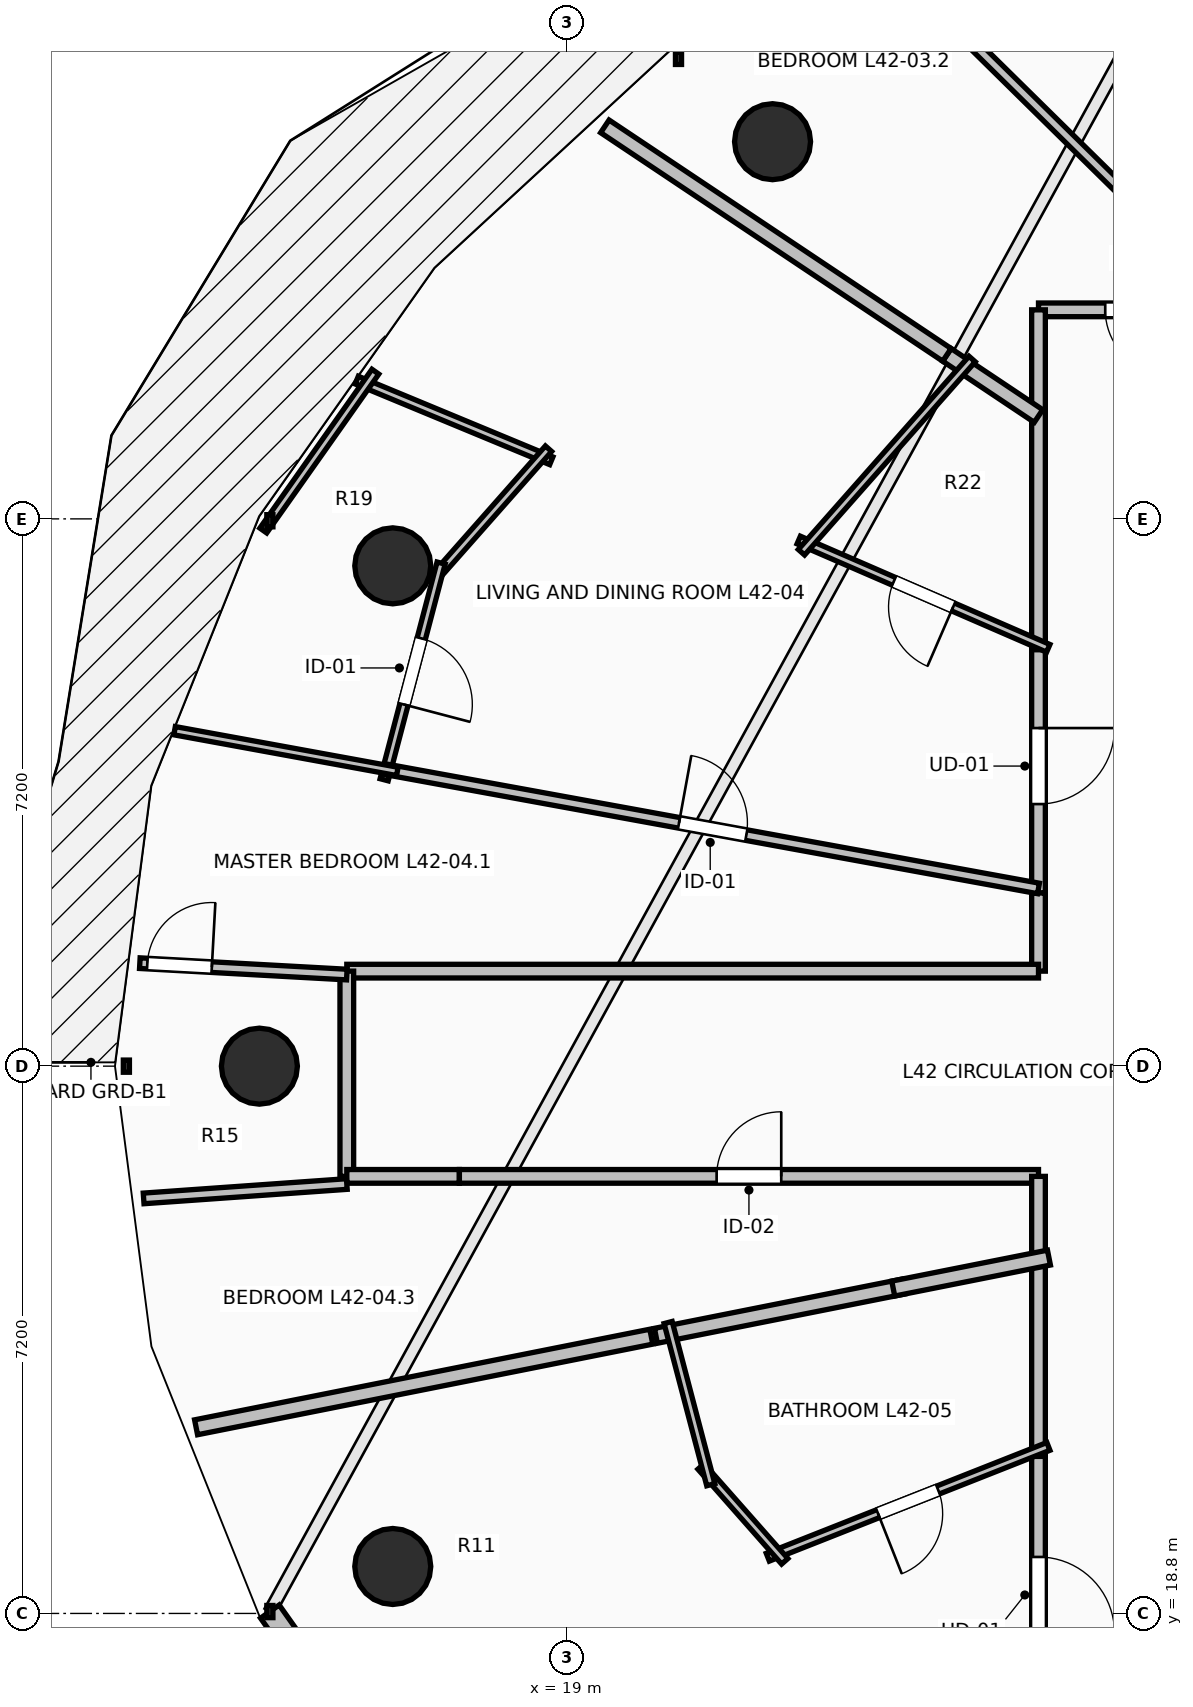
"""IFC4 building model, lengths in metres.
Left out: names, types, materials, properties, quantities, classifications, styles, units other than length and angle.
Written with IfcOpenShell. Run it as: python <this file> out.ifc"""

import sys

from ifc_helpers import new_model, si_unit, direction, frame, frame_2d, origin, origin_2d, place, context, subcontext, project, spatial, rectangle, circle, extrude, element, fill, save


model = new_model("IFC4")
c1 = context("Model", 3, precision=1e-05, world=origin(), true_north=direction((0.0, 1.0)))
c2 = subcontext(c1, "Body", "Model", "MODEL_VIEW")
j1 = project(units=[si_unit("LENGTHUNIT", "METRE"), si_unit("PLANEANGLEUNIT", "RADIAN")], contexts=[c1])
p1 = place(None, origin())
s1 = spatial("IfcSite", under=j1, at=p1, CompositionType="ELEMENT")
p2 = place(p1, origin())
s2 = spatial("IfcBuilding", under=s1, at=p2, CompositionType="ELEMENT")
p3 = place(p2, frame((0.0, 0.0, 157.1)))
s3 = spatial("IfcBuildingStorey", under=s2, at=p3, CompositionType="ELEMENT", Elevation=157.1)
for number, where, z_axis, x_axis in (
    (1, (21.701, 38.162, 0.0), (0.0, 0.0, 1.0), (-0.707, 0.707, 0.0)),
    (2, (16.705, 32.582, 0.0), (0.0, 0.0, 1.0), (-0.924, 0.383, 0.0)),
    (3, (14.95, 26.0, 0.0), (0.0, 0.0, 1.0), (-1.0, 0.0, 0.0)),
    (4, (16.705, 19.418, 0.0), (0.0, 0.0, 1.0), (-0.924, -0.383, 0.0)),
):
    element("IfcColumn", number, at=place(p3, frame(where, z_axis=z_axis, x_axis=x_axis)), inside=s3, PredefinedType="COLUMN", context=c2, shape_type="SweptSolid", body=[
        extrude(circle(Radius=0.5, at=origin_2d()), origin(), (0.0, 0.0, 1.0), 3.5),
    ])
p4 = place(p3, frame((15.088, 18.825, 0.0), z_axis=(0.0, 0.0, 1.0), x_axis=(0.577269753207, -0.816553508371, 0.0)))
e5 = element("IfcWall", 5, at=p4, inside=s3, PredefinedType="STANDARD", context=c2, shape_type="SweptSolid", body=[
    extrude(rectangle(XDim=3.97, YDim=0.3, at=frame_2d((1.985, 0.0))), origin(), (0.0, 0.0, 1.0), 3.24),
])
p5 = place(p3, frame((27.806, 35.95, 0.0), z_axis=(0.0, 0.0, 1.0), x_axis=(-1.0, 0.0, 0.0)))
e6 = element("IfcWall", 6, at=p5, inside=s3, PredefinedType="PARTITIONING", context=c2, shape_type="SweptSolid", body=[
    extrude(rectangle(XDim=2.606, YDim=0.18, at=frame_2d((1.303, 0.0))), origin(), (0.0, 0.0, 1.0), 2.432),
])
p6 = place(p5, frame((0.878, 0.0, 0.0)))
e7 = element("IfcOpeningElement", 7, at=p6, cuts=e6, PredefinedType="OPENING", context=c2, shape_type="SweptSolid", body=[
    extrude(rectangle(XDim=0.85, YDim=2.1, at=frame_2d((0.425, 1.05))), frame((0.0, 0.105, 0.0), z_axis=(0.0, -1.0, 0.0), x_axis=(1.0, 0.0, 0.0)), (0.0, 0.0, 1.0), 0.21),
])
p7 = place(p3, frame((25.2, 35.95, 0.0), z_axis=(0.0, 0.0, 1.0), x_axis=(0.0, -1.0, 0.0)))
e8 = element("IfcWall", 8, at=p7, inside=s3, PredefinedType="PARTITIONING", context=c2, shape_type="SweptSolid", body=[
    extrude(rectangle(XDim=1.457, YDim=0.18, at=frame_2d((0.729, 0.0))), origin(), (0.0, 0.0, 1.0), 2.432),
])
p8 = place(p3, frame((25.2, 31.618, 0.0), z_axis=(0.0, 0.0, 1.0), x_axis=(0.0, -1.0, 0.0)))
e9 = element("IfcWall", 9, at=p8, inside=s3, PredefinedType="PARTITIONING", context=c2, shape_type="SweptSolid", body=[
    extrude(rectangle(XDim=3.34, YDim=0.18, at=frame_2d((1.67, 0.0))), origin(), (0.0, 0.0, 1.0), 2.432),
])
p9 = place(p8, frame((1.17, 0.0, 0.0)))
e10 = element("IfcOpeningElement", 10, at=p9, cuts=e9, PredefinedType="OPENING", context=c2, shape_type="SweptSolid", body=[
    extrude(rectangle(XDim=1.0, YDim=2.15, at=frame_2d((0.5, 1.075))), frame((0.0, 0.105, 0.0), z_axis=(0.0, -1.0, 0.0), x_axis=(1.0, 0.0, 0.0)), (0.0, 0.0, 1.0), 0.21),
])
p10 = place(p3, frame((25.2, 34.633, 0.0), z_axis=(0.0, 0.0, 1.0), x_axis=(0.0, -1.0, 0.0)))
e11 = element("IfcWall", 11, at=p10, inside=s3, PredefinedType="PARTITIONING", context=c2, shape_type="SweptSolid", body=[
    extrude(rectangle(XDim=3.155, YDim=0.18, at=frame_2d((1.578, 0.0))), origin(), (0.0, 0.0, 1.0), 2.432),
])
p11 = place(p3, frame((25.2, 28.278, 0.0), z_axis=(0.0, 0.0, 1.0), x_axis=(0.0, -1.0, 0.0)))
e12 = element("IfcWall", 12, at=p11, inside=s3, PredefinedType="PARTITIONING", context=c2, shape_type="SweptSolid", body=[
    extrude(rectangle(XDim=1.028, YDim=0.18, at=frame_2d((0.514, 0.0))), origin(), (0.0, 0.0, 1.0), 2.432),
])
p12 = place(p3, frame((25.2, 27.25, 0.0), z_axis=(0.0, 0.0, 1.0), x_axis=(-1.0, 0.0, 0.0)))
e13 = element("IfcWall", 13, at=p12, inside=s3, PredefinedType="PARTITIONING", context=c2, shape_type="SweptSolid", body=[
    extrude(rectangle(XDim=9.1, YDim=0.18, at=frame_2d((4.55, 0.0))), origin(), (0.0, 0.0, 1.0), 2.432),
])
p13 = place(p3, frame((16.1, 27.25, 0.0), z_axis=(0.0, 0.0, 1.0), x_axis=(0.0, -1.0, 0.0)))
e14 = element("IfcWall", 14, at=p13, inside=s3, PredefinedType="PARTITIONING", context=c2, shape_type="SweptSolid", body=[
    extrude(rectangle(XDim=2.7, YDim=0.18, at=frame_2d((1.35, 0.0))), origin(), (0.0, 0.0, 1.0), 2.432),
])
p14 = place(p3, frame((16.1, 24.55, 0.0), z_axis=(0.0, 0.0, 1.0), x_axis=(1.0, 0.0, 0.0)))
e15 = element("IfcWall", 15, at=p14, inside=s3, PredefinedType="PARTITIONING", context=c2, shape_type="SweptSolid", body=[
    extrude(rectangle(XDim=1.481, YDim=0.18, at=frame_2d((0.74, 0.0))), origin(), (0.0, 0.0, 1.0), 3.24),
])
p15 = place(p3, frame((17.581, 24.55, 0.0), z_axis=(0.0, 0.0, 1.0), x_axis=(1.0, 0.0, 0.0)))
e16 = element("IfcWall", 16, at=p15, inside=s3, PredefinedType="PARTITIONING", context=c2, shape_type="SweptSolid", body=[
    extrude(rectangle(XDim=7.619, YDim=0.18, at=frame_2d((3.81, 0.0))), origin(), (0.0, 0.0, 1.0), 2.886),
])
p16 = place(p15, frame((3.385, 0.0, 0.0)))
e17 = element("IfcOpeningElement", 17, at=p16, cuts=e16, PredefinedType="OPENING", context=c2, shape_type="SweptSolid", body=[
    extrude(rectangle(XDim=0.85, YDim=2.1, at=frame_2d((0.425, 1.05))), frame((0.0, 0.105, 0.0), z_axis=(0.0, -1.0, 0.0), x_axis=(1.0, 0.0, 0.0)), (0.0, 0.0, 1.0), 0.21),
])
p17 = place(p3, frame((25.2, 24.55, 0.0), z_axis=(0.0, 0.0, 1.0), x_axis=(0.0, -1.0, 0.0)))
e18 = element("IfcWall", 18, at=p17, inside=s3, PredefinedType="PARTITIONING", context=c2, shape_type="SweptSolid", body=[
    extrude(rectangle(XDim=1.157, YDim=0.18, at=frame_2d((0.579, 0.0))), origin(), (0.0, 0.0, 1.0), 3.24),
])
p18 = place(p3, frame((25.2, 21.006, 0.0), z_axis=(0.0, 0.0, 1.0), x_axis=(0.0, -1.0, 0.0)))
e19 = element("IfcWall", 19, at=p18, inside=s3, PredefinedType="PARTITIONING", context=c2, shape_type="SweptSolid", body=[
    extrude(rectangle(XDim=3.926, YDim=0.18, at=frame_2d((1.963, 0.0))), origin(), (0.0, 0.0, 1.0), 2.432),
])
p19 = place(p18, frame((1.463, 0.0, 0.0)))
e20 = element("IfcOpeningElement", 20, at=p19, cuts=e19, PredefinedType="OPENING", context=c2, shape_type="SweptSolid", body=[
    extrude(rectangle(XDim=1.0, YDim=2.15, at=frame_2d((0.5, 1.075))), frame((0.0, 0.105, 0.0), z_axis=(0.0, -1.0, 0.0), x_axis=(1.0, 0.0, 0.0)), (0.0, 0.0, 1.0), 0.21),
])
p20 = place(p3, frame((25.2, 23.533, 0.0), z_axis=(0.0, 0.0, 1.0), x_axis=(0.0, -1.0, 0.0)))
e21 = element("IfcWall", 21, at=p20, inside=s3, PredefinedType="PARTITIONING", context=c2, shape_type="SweptSolid", body=[
    extrude(rectangle(XDim=2.667, YDim=0.18, at=frame_2d((1.333, 0.0))), origin(), (0.0, 0.0, 1.0), 3.24),
])
p21 = place(p3, frame((22.96, 40.806, 0.0), z_axis=(0.0, 0.0, 1.0), x_axis=(0.712587980465, -0.70158276069, 0.0)))
e22 = element("IfcWall", 22, at=p21, inside=s3, PredefinedType="PARTITIONING", context=c2, shape_type="SweptSolid", body=[
    extrude(rectangle(XDim=6.921, YDim=0.14, at=frame_2d((3.461, 0.0))), origin(), (0.0, 0.0, 1.0), 2.432),
])
p22 = place(p3, frame((23.995, 35.358, 0.0), z_axis=(0.0, 0.0, 1.0), x_axis=(0.831505536539, -0.555516464837, 0.0)))
e23 = element("IfcWall", 23, at=p22, inside=s3, PredefinedType="PARTITIONING", context=c2, shape_type="SweptSolid", body=[
    extrude(rectangle(XDim=1.449, YDim=0.2, at=frame_2d((0.725, 0.0))), origin(), (0.0, 0.0, 1.0), 3.24),
])
p23 = place(p3, frame((19.495, 38.364, 0.0), z_axis=(0.0, 0.0, 1.0), x_axis=(0.831529389247, -0.55548076008, 0.0)))
e24 = element("IfcWall", 24, at=p23, inside=s3, PredefinedType="PARTITIONING", context=c2, shape_type="SweptSolid", body=[
    extrude(rectangle(XDim=5.412, YDim=0.2, at=frame_2d((2.706, 0.0))), origin(), (0.0, 0.0, 1.0), 2.728),
])
p24 = place(p3, frame((25.328, 31.497, 0.0), z_axis=(0.0, 0.0, 1.0), x_axis=(-0.917371334891, 0.398032453351, 0.0)))
e25 = element("IfcWall", 25, at=p24, inside=s3, PredefinedType="PARTITIONING", context=c2, shape_type="SweptSolid", body=[
    extrude(rectangle(XDim=3.578, YDim=0.11, at=frame_2d((1.789, 0.0))), origin(), (0.0, 0.0, 1.0), 2.886),
])
p25 = place(p24, frame((1.364, 0.0, 0.0)))
e26 = element("IfcOpeningElement", 26, at=p25, cuts=e25, PredefinedType="OPENING", context=c2, shape_type="SweptSolid", body=[
    extrude(rectangle(XDim=0.85, YDim=2.1, at=frame_2d((0.425, 1.05))), frame((0.0, 0.07, 0.0), z_axis=(0.0, -1.0, 0.0), x_axis=(1.0, 0.0, 0.0)), (0.0, 0.0, 1.0), 0.14),
])
p26 = place(p3, frame((22.081, 32.761, 0.0), z_axis=(0.0, 0.0, 1.0), x_axis=(0.662023888113, 0.749482736004, 0.0)))
e27 = element("IfcWall", 27, at=p26, inside=s3, PredefinedType="PARTITIONING", context=c2, shape_type="SweptSolid", body=[
    extrude(rectangle(XDim=3.392, YDim=0.11, at=frame_2d((1.696, 0.0))), origin(), (0.0, 0.0, 1.0), 3.24),
])
p27 = place(p3, frame((16.231, 35.026, 0.0), z_axis=(0.0, 0.0, 1.0), x_axis=(0.923742873908, -0.383013188943, 0.0)))
e28 = element("IfcWall", 28, at=p27, inside=s3, PredefinedType="PARTITIONING", context=c2, shape_type="SweptSolid", body=[
    extrude(rectangle(XDim=2.771, YDim=0.11, at=frame_2d((1.385, 0.0))), origin(), (0.0, 0.0, 1.0), 2.728),
])
p28 = place(p3, frame((18.754, 34.123, 0.0), z_axis=(0.0, 0.0, 1.0), x_axis=(-0.66207590595, -0.749436785033, 0.0)))
e29 = element("IfcWall", 29, at=p28, inside=s3, PredefinedType="PARTITIONING", context=c2, shape_type="SweptSolid", body=[
    extrude(rectangle(XDim=2.328, YDim=0.11, at=frame_2d((1.164, 0.0))), origin(), (0.0, 0.0, 1.0), 2.432),
])
p29 = place(p3, frame((17.341, 32.618, 0.0), z_axis=(0.0, 0.0, 1.0), x_axis=(-0.254191595923, -0.967153882566, 0.0)))
e30 = element("IfcWall", 30, at=p29, inside=s3, PredefinedType="PARTITIONING", context=c2, shape_type="SweptSolid", body=[
    extrude(rectangle(XDim=2.948, YDim=0.11, at=frame_2d((1.474, 0.0))), origin(), (0.0, 0.0, 1.0), 2.432),
])
p30 = place(p29, frame((1.024, 0.0, 0.0)))
e31 = element("IfcOpeningElement", 31, at=p30, cuts=e30, PredefinedType="OPENING", context=c2, shape_type="SweptSolid", body=[
    extrude(rectangle(XDim=0.9, YDim=2.1, at=frame_2d((0.45, 1.05))), frame((0.0, 0.07, 0.0), z_axis=(0.0, -1.0, 0.0), x_axis=(1.0, 0.0, 0.0)), (0.0, 0.0, 1.0), 0.14),
])
p31 = place(p3, frame((16.476, 35.136, 0.0), z_axis=(0.0, 0.0, 1.0), x_axis=(-0.576469555269, -0.81711862777, 0.0)))
e32 = element("IfcWall", 32, at=p31, inside=s3, PredefinedType="PARTITIONING", context=c2, shape_type="SweptSolid", body=[
    extrude(rectangle(XDim=2.558, YDim=0.11, at=frame_2d((1.279, 0.0))), origin(), (0.0, 0.0, 1.0), 3.24),
])
p32 = place(p3, frame((16.627, 29.903, 0.0), z_axis=(0.0, 0.0, 1.0), x_axis=(0.983739211704, -0.179602793286, 0.0)))
e33 = element("IfcWall", 33, at=p32, inside=s3, PredefinedType="PARTITIONING", context=c2, shape_type="SweptSolid", body=[
    extrude(rectangle(XDim=8.715, YDim=0.14, at=frame_2d((4.357, 0.0))), origin(), (0.0, 0.0, 1.0), 2.886),
])
p33 = place(p32, frame((3.907, 0.0, 0.0)))
e34 = element("IfcOpeningElement", 34, at=p33, cuts=e33, PredefinedType="OPENING", context=c2, shape_type="SweptSolid", body=[
    extrude(rectangle(XDim=0.9, YDim=2.1, at=frame_2d((0.45, 1.05))), frame((0.0, 0.085, 0.0), z_axis=(0.0, -1.0, 0.0), x_axis=(1.0, 0.0, 0.0)), (0.0, 0.0, 1.0), 0.17),
])
p34 = place(p3, frame((13.834, 30.413, 0.0), z_axis=(0.0, 0.0, 1.0), x_axis=(0.983716126889, -0.179729189891, 0.0)))
e35 = element("IfcWall", 35, at=p34, inside=s3, PredefinedType="PARTITIONING", context=c2, shape_type="SweptSolid", body=[
    extrude(rectangle(XDim=2.979, YDim=0.11, at=frame_2d((1.49, 0.0))), origin(), (0.0, 0.0, 1.0), 2.728),
])
p35 = place(p3, frame((13.377, 27.355, 0.0), z_axis=(0.0, 0.0, 1.0), x_axis=(0.998488320145, -0.054964302364, 0.0)))
e36 = element("IfcWall", 36, at=p35, inside=s3, PredefinedType="PARTITIONING", context=c2, shape_type="SweptSolid", body=[
    extrude(rectangle(XDim=2.727, YDim=0.14, at=frame_2d((1.364, 0.0))), origin(), (0.0, 0.0, 1.0), 2.728),
])
p36 = place(p35, frame((0.099, 0.0, 0.0)))
e37 = element("IfcOpeningElement", 37, at=p36, cuts=e36, PredefinedType="OPENING", context=c2, shape_type="SweptSolid", body=[
    extrude(rectangle(XDim=0.85, YDim=2.1, at=frame_2d((0.425, 1.05))), frame((0.0, 0.085, 0.0), z_axis=(0.0, -1.0, 0.0), x_axis=(1.0, 0.0, 0.0)), (0.0, 0.0, 1.0), 0.17),
])
p37 = place(p3, frame((13.427, 24.26, 0.0), z_axis=(0.0, 0.0, 1.0), x_axis=(0.997504277417, 0.070606065851, 0.0)))
e38 = element("IfcWall", 38, at=p37, inside=s3, PredefinedType="PARTITIONING", context=c2, shape_type="SweptSolid", body=[
    extrude(rectangle(XDim=2.68, YDim=0.14, at=frame_2d((1.34, 0.0))), origin(), (0.0, 0.0, 1.0), 2.728),
])
p38 = place(p3, frame((14.117, 21.249, 0.0), z_axis=(0.0, 0.0, 1.0), x_axis=(0.980766298352, 0.19518572698, 0.0)))
e39 = element("IfcWall", 39, at=p38, inside=s3, PredefinedType="PARTITIONING", context=c2, shape_type="SweptSolid", body=[
    extrude(rectangle(XDim=6.106, YDim=0.2, at=frame_2d((3.053, 0.0))), origin(), (0.0, 0.0, 1.0), 2.728),
])
p39 = place(p3, frame((20.167, 22.453, 0.0), z_axis=(0.0, 0.0, 1.0), x_axis=(0.980766708229, 0.195183667423, 0.0)))
e40 = element("IfcWall", 40, at=p39, inside=s3, PredefinedType="PARTITIONING", context=c2, shape_type="SweptSolid", body=[
    extrude(rectangle(XDim=3.323, YDim=0.2, at=frame_2d((1.662, 0.0))), origin(), (0.0, 0.0, 1.0), 2.972),
])
p40 = place(p3, frame((23.289, 23.074, 0.0), z_axis=(0.0, 0.0, 1.0), x_axis=(0.980804842296, 0.194991951961, 0.0)))
e41 = element("IfcWall", 41, at=p40, inside=s3, PredefinedType="PARTITIONING", context=c2, shape_type="SweptSolid", body=[
    extrude(rectangle(XDim=2.088, YDim=0.2, at=frame_2d((1.044, 0.0))), origin(), (0.0, 0.0, 1.0), 2.886),
])
p41 = place(p3, frame((25.33, 20.997, 0.0), z_axis=(0.0, 0.0, 1.0), x_axis=(-0.930092731386, -0.367324803169, 0.0)))
e42 = element("IfcWall", 42, at=p41, inside=s3, PredefinedType="PARTITIONING", context=c2, shape_type="SweptSolid", body=[
    extrude(rectangle(XDim=3.969, YDim=0.11, at=frame_2d((1.984, 0.0))), origin(), (0.0, 0.0, 1.0), 2.886),
])
p42 = place(p41, frame((1.559, 0.0, 0.0)))
e43 = element("IfcOpeningElement", 43, at=p42, cuts=e42, PredefinedType="OPENING", context=c2, shape_type="SweptSolid", body=[
    extrude(rectangle(XDim=0.85, YDim=2.1, at=frame_2d((0.425, 1.05))), frame((0.0, 0.07, 0.0), z_axis=(0.0, -1.0, 0.0), x_axis=(1.0, 0.0, 0.0)), (0.0, 0.0, 1.0), 0.14),
])
p43 = place(p3, frame((21.862, 19.486, 0.0), z_axis=(0.0, 0.0, 1.0), x_axis=(-0.661645897528, 0.749816448396, 0.0)))
e44 = element("IfcWall", 44, at=p43, inside=s3, PredefinedType="PARTITIONING", context=c2, shape_type="SweptSolid", body=[
    extrude(rectangle(XDim=1.664, YDim=0.11, at=frame_2d((0.832, 0.0))), origin(), (0.0, 0.0, 1.0), 3.24),
])
p44 = place(p3, frame((20.889, 20.494, 0.0), z_axis=(0.0, 0.0, 1.0), x_axis=(-0.254389812051, 0.967101764823, 0.0)))
e45 = element("IfcWall", 45, at=p44, inside=s3, PredefinedType="PARTITIONING", context=c2, shape_type="SweptSolid", body=[
    extrude(rectangle(XDim=2.206, YDim=0.11, at=frame_2d((1.103, 0.0))), origin(), (0.0, 0.0, 1.0), 3.24),
])
p45 = place(p9, origin())
e46 = element("IfcDoor", 46, at=p45, inside=s3, OperationType="SINGLE_SWING_LEFT", PredefinedType="DOOR", context=c2, shape_type="SweptSolid", body=[
    extrude(rectangle(XDim=1.0, YDim=2.15, at=frame_2d((0.5, 1.075))), frame((0.0, 0.025, 0.0), z_axis=(0.0, -1.0, 0.0), x_axis=(1.0, 0.0, 0.0)), (0.0, 0.0, 1.0), 0.05),
])
fill(e10, e46)
p46 = place(p19, origin())
e47 = element("IfcDoor", 47, at=p46, inside=s3, OperationType="SINGLE_SWING_RIGHT", PredefinedType="DOOR", context=c2, shape_type="SweptSolid", body=[
    extrude(rectangle(XDim=1.0, YDim=2.15, at=frame_2d((0.5, 1.075))), frame((0.0, 0.025, 0.0), z_axis=(0.0, -1.0, 0.0), x_axis=(1.0, 0.0, 0.0)), (0.0, 0.0, 1.0), 0.05),
])
fill(e20, e47)
p47 = place(p25, origin())
e48 = element("IfcDoor", 48, at=p47, inside=s3, OperationType="SINGLE_SWING_LEFT", PredefinedType="DOOR", context=c2, shape_type="SweptSolid", body=[
    extrude(rectangle(XDim=0.85, YDim=2.1, at=frame_2d((0.425, 1.05))), frame((0.0, 0.025, 0.0), z_axis=(0.0, -1.0, 0.0), x_axis=(1.0, 0.0, 0.0)), (0.0, 0.0, 1.0), 0.05),
])
fill(e26, e48)
p48 = place(p30, origin())
e49 = element("IfcDoor", 49, at=p48, inside=s3, OperationType="SINGLE_SWING_RIGHT", PredefinedType="DOOR", context=c2, shape_type="SweptSolid", body=[
    extrude(rectangle(XDim=0.9, YDim=2.1, at=frame_2d((0.45, 1.05))), frame((0.0, 0.025, 0.0), z_axis=(0.0, -1.0, 0.0), x_axis=(1.0, 0.0, 0.0)), (0.0, 0.0, 1.0), 0.05),
])
fill(e31, e49)
p49 = place(p33, origin())
e50 = element("IfcDoor", 50, at=p49, inside=s3, OperationType="SINGLE_SWING_LEFT", PredefinedType="DOOR", context=c2, shape_type="SweptSolid", body=[
    extrude(rectangle(XDim=0.9, YDim=2.1, at=frame_2d((0.45, 1.05))), frame((0.0, 0.025, 0.0), z_axis=(0.0, -1.0, 0.0), x_axis=(1.0, 0.0, 0.0)), (0.0, 0.0, 1.0), 0.05),
])
fill(e34, e50)
p50 = place(p42, origin())
e51 = element("IfcDoor", 51, at=p50, inside=s3, OperationType="SINGLE_SWING_RIGHT", PredefinedType="DOOR", context=c2, shape_type="SweptSolid", body=[
    extrude(rectangle(XDim=0.85, YDim=2.1, at=frame_2d((0.425, 1.05))), frame((0.0, 0.025, 0.0), z_axis=(0.0, -1.0, 0.0), x_axis=(1.0, 0.0, 0.0)), (0.0, 0.0, 1.0), 0.05),
])
fill(e43, e51)
p51 = place(p6, origin())
e52 = element("IfcDoor", 52, at=p51, inside=s3, OperationType="SINGLE_SWING_LEFT", PredefinedType="DOOR", context=c2, shape_type="SweptSolid", body=[
    extrude(rectangle(XDim=0.85, YDim=2.1, at=frame_2d((0.425, 1.05))), frame((0.0, 0.025, 0.0), z_axis=(0.0, -1.0, 0.0), x_axis=(1.0, 0.0, 0.0)), (0.0, 0.0, 1.0), 0.05),
])
fill(e7, e52)
p52 = place(p16, origin())
e53 = element("IfcDoor", 53, at=p52, inside=s3, OperationType="SINGLE_SWING_RIGHT", PredefinedType="DOOR", context=c2, shape_type="SweptSolid", body=[
    extrude(rectangle(XDim=0.85, YDim=2.1, at=frame_2d((0.425, 1.05))), frame((0.0, 0.025, 0.0), z_axis=(0.0, -1.0, 0.0), x_axis=(1.0, 0.0, 0.0)), (0.0, 0.0, 1.0), 0.05),
])
fill(e17, e53)
p53 = place(p36, origin())
e54 = element("IfcDoor", 54, at=p53, inside=s3, OperationType="SINGLE_SWING_RIGHT", PredefinedType="DOOR", context=c2, shape_type="SweptSolid", body=[
    extrude(rectangle(XDim=0.85, YDim=2.1, at=frame_2d((0.425, 1.05))), frame((0.0, 0.025, 0.0), z_axis=(0.0, -1.0, 0.0), x_axis=(1.0, 0.0, 0.0)), (0.0, 0.0, 1.0), 0.05),
])
fill(e37, e54)
save(model, sys.argv[1])
